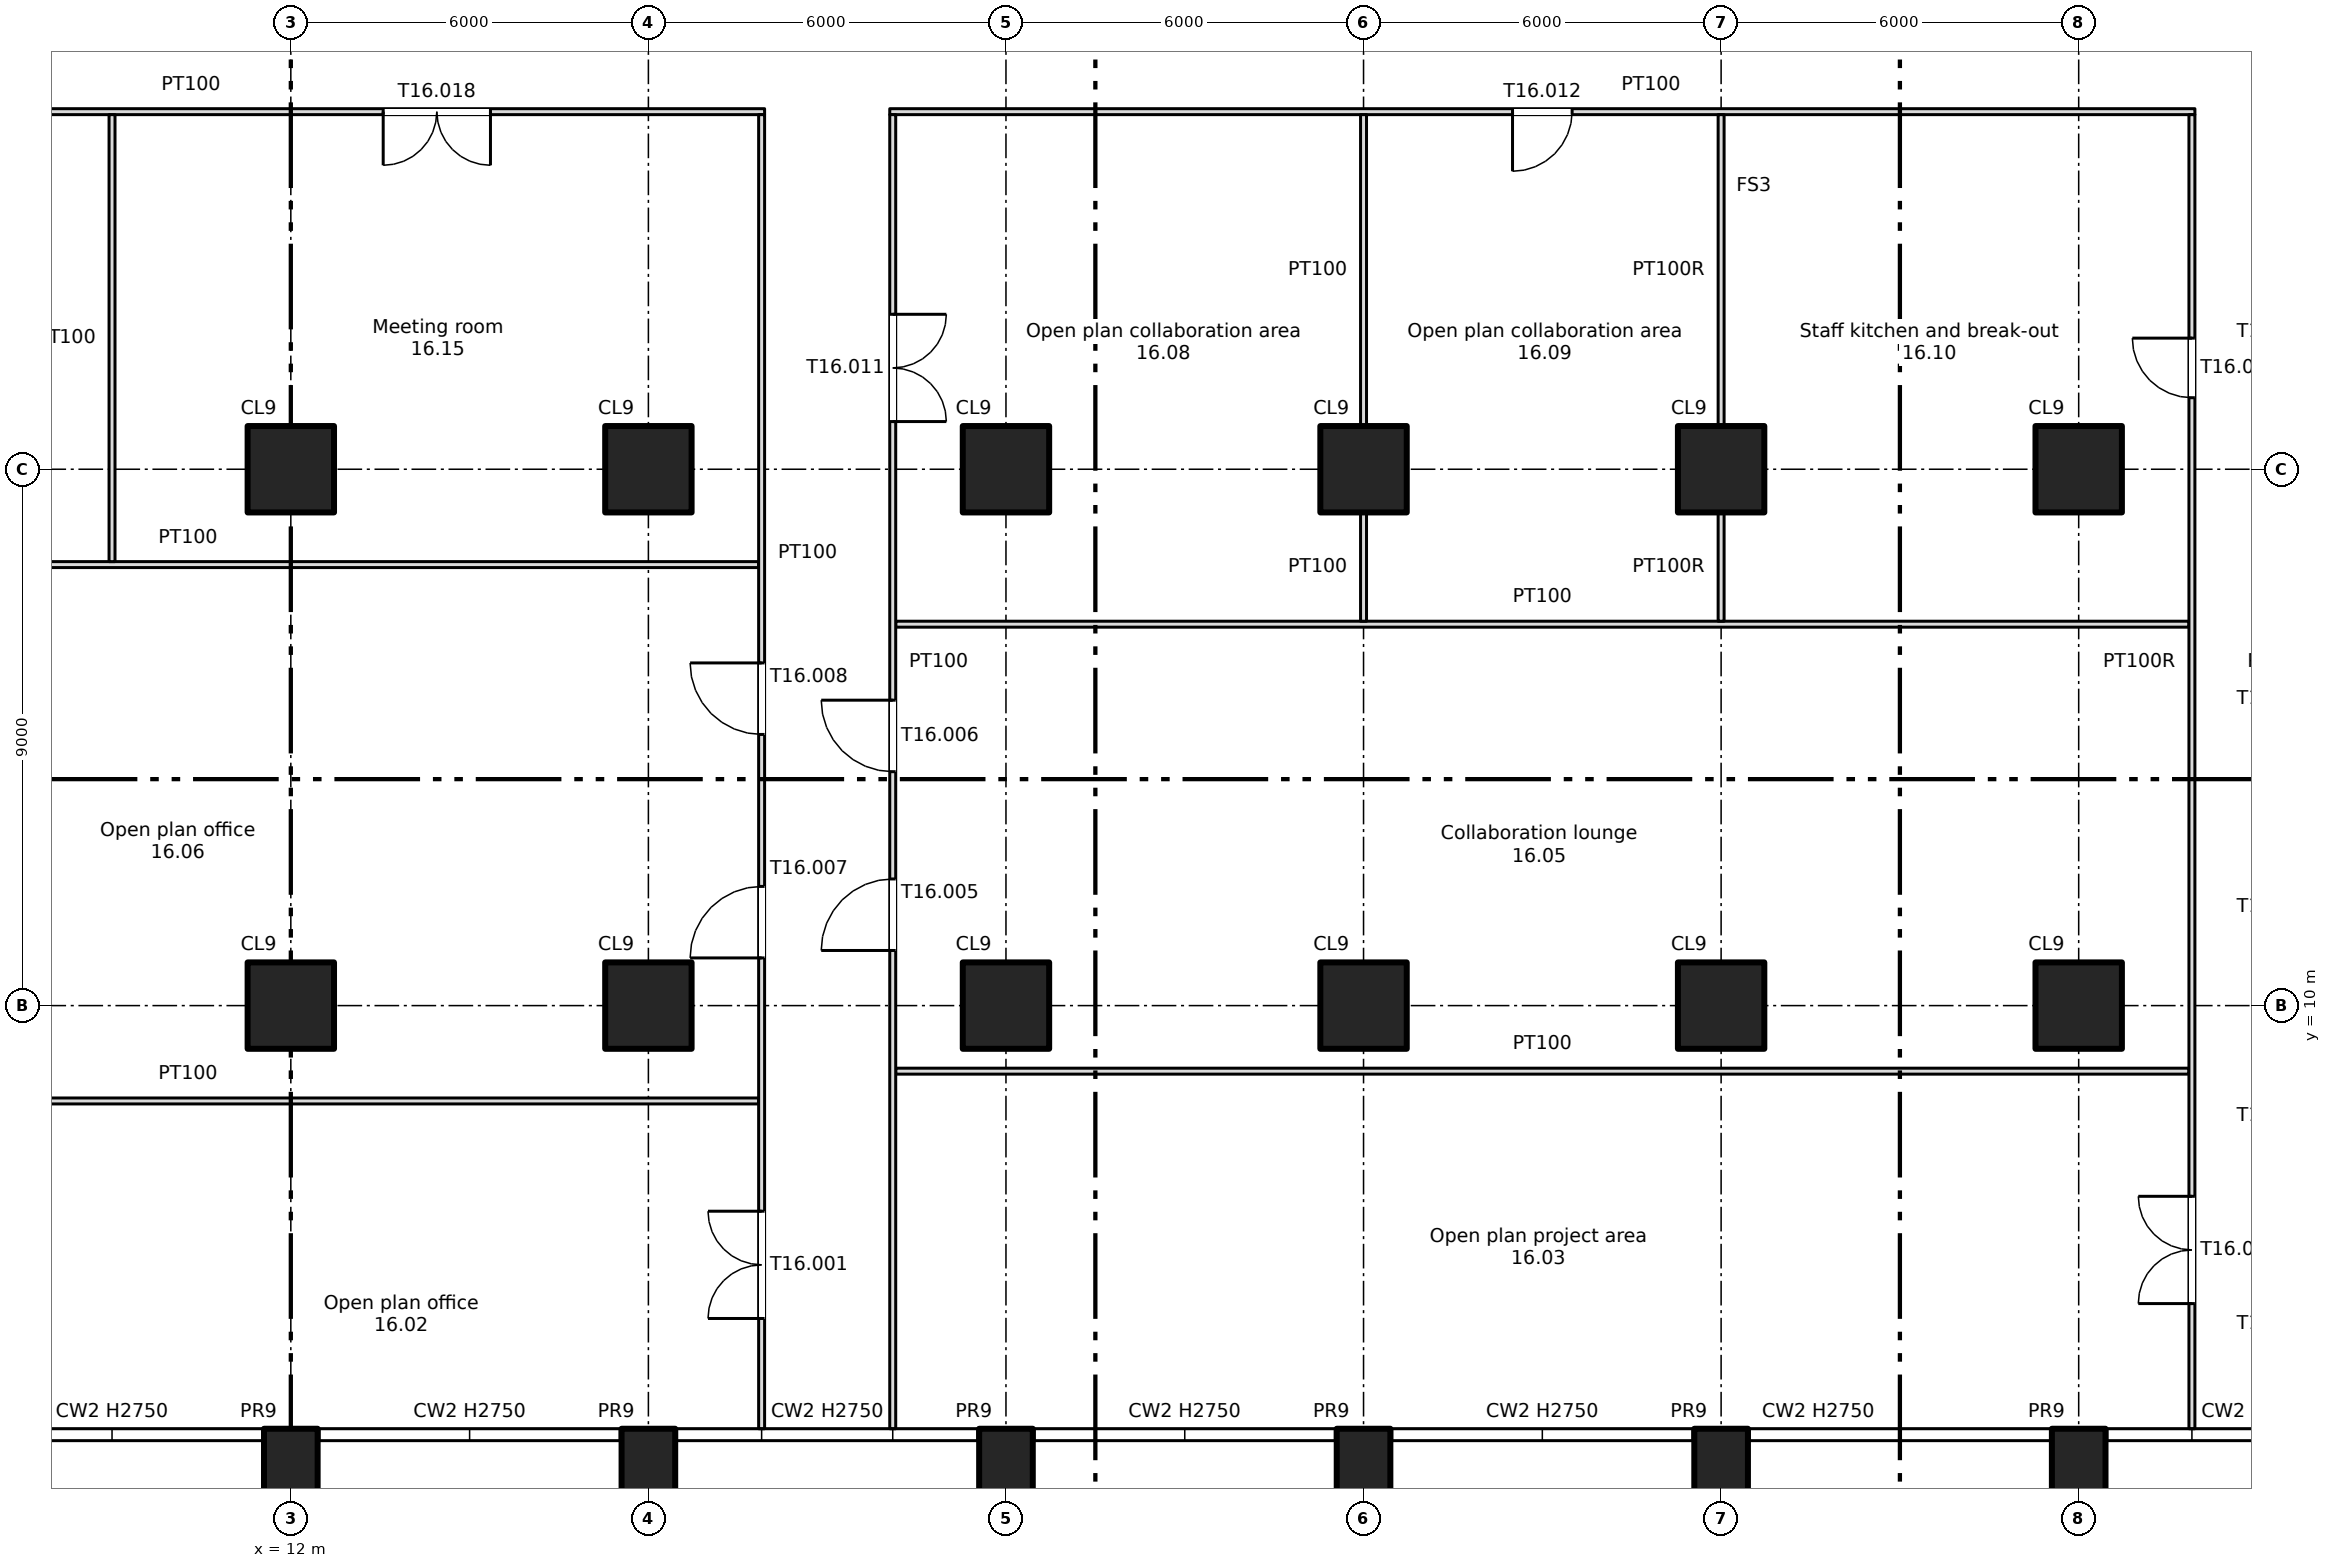
"""IFC4 building model, lengths in metres.
Left out: names, types, materials, properties, quantities, classifications, styles, units other than length and angle.
Written with IfcOpenShell. Run it as: python <this file> out.ifc"""

import sys

from ifc_helpers import new_model, si_unit, direction, frame, frame_2d, origin, origin_2d, place, context, subcontext, project, spatial, rectangle, extrude, element, fill, save


model = new_model("IFC4")
c1 = context("Model", 3, precision=1e-05, world=origin(), true_north=direction((0.0, 1.0)))
c2 = subcontext(c1, "Body", "Model", "MODEL_VIEW")
j1 = project(units=[si_unit("LENGTHUNIT", "METRE"), si_unit("PLANEANGLEUNIT", "RADIAN")], contexts=[c1])
p1 = place(None, origin())
s1 = spatial("IfcSite", under=j1, at=p1, CompositionType="ELEMENT")
p2 = place(p1, origin())
s2 = spatial("IfcBuilding", under=s1, at=p2, CompositionType="ELEMENT")
p3 = place(p2, frame((0.0, 0.0, 98.75)))
s3 = spatial("IfcBuildingStorey", under=s2, at=p3, CompositionType="ELEMENT", Elevation=98.75)
for number, where, z_axis, x_axis in (
    (1, (12.0, 2.2, -0.4), (0.0, 0.0, 1.0), (1.0, 0.0, 0.0)),
    (2, (18.0, 2.2, -0.4), (0.0, 0.0, 1.0), (1.0, 0.0, 0.0)),
    (3, (24.0, 2.2, -0.4), (0.0, 0.0, 1.0), (1.0, 0.0, 0.0)),
    (4, (30.0, 2.2, -0.4), (0.0, 0.0, 1.0), (1.0, 0.0, 0.0)),
    (5, (36.0, 2.2, -0.4), (0.0, 0.0, 1.0), (1.0, 0.0, 0.0)),
    (6, (42.0, 2.2, -0.4), (0.0, 0.0, 1.0), (1.0, 0.0, 0.0)),
):
    element("IfcColumn", number, at=place(p3, frame(where, z_axis=z_axis, x_axis=x_axis)), inside=s3, PredefinedType="COLUMN", context=c2, shape_type="SweptSolid", body=[
        extrude(rectangle(XDim=0.9, YDim=1.4, at=origin_2d()), origin(), (0.0, 0.0, 1.0), 3.75),
    ])
for number, where, z_axis, x_axis in (
    (7, (12.0, 10.0, 0.0), (0.0, 0.0, 1.0), (1.0, 0.0, 0.0)),
    (8, (12.0, 19.0, 0.0), (0.0, 0.0, 1.0), (1.0, 0.0, 0.0)),
    (9, (18.0, 10.0, 0.0), (0.0, 0.0, 1.0), (1.0, 0.0, 0.0)),
    (10, (18.0, 19.0, 0.0), (0.0, 0.0, 1.0), (1.0, 0.0, 0.0)),
    (11, (24.0, 10.0, 0.0), (0.0, 0.0, 1.0), (1.0, 0.0, 0.0)),
    (12, (24.0, 19.0, 0.0), (0.0, 0.0, 1.0), (1.0, 0.0, 0.0)),
    (13, (30.0, 10.0, 0.0), (0.0, 0.0, 1.0), (1.0, 0.0, 0.0)),
    (14, (30.0, 19.0, 0.0), (0.0, 0.0, 1.0), (1.0, 0.0, 0.0)),
    (15, (36.0, 10.0, 0.0), (0.0, 0.0, 1.0), (1.0, 0.0, 0.0)),
    (16, (36.0, 19.0, 0.0), (0.0, 0.0, 1.0), (1.0, 0.0, 0.0)),
    (17, (42.0, 10.0, 0.0), (0.0, 0.0, 1.0), (1.0, 0.0, 0.0)),
    (18, (42.0, 19.0, 0.0), (0.0, 0.0, 1.0), (1.0, 0.0, 0.0)),
):
    element("IfcColumn", number, at=place(p3, frame(where, z_axis=z_axis, x_axis=x_axis)), inside=s3, PredefinedType="COLUMN", context=c2, shape_type="SweptSolid", body=[
        extrude(rectangle(XDim=1.45, YDim=1.45, at=origin_2d()), origin(), (0.0, 0.0, 1.0), 3.35),
    ])
p4 = place(p3, frame((0.7, 8.4, 0.0), z_axis=(0.0, 0.0, 1.0), x_axis=(1.0, 0.0, 0.0)))
e19 = element("IfcWall", 19, at=p4, inside=s3, PredefinedType="PARTITIONING", context=c2, shape_type="SweptSolid", body=[
    extrude(rectangle(XDim=19.15, YDim=0.1, at=frame_2d((9.575, 0.0))), origin(), (0.0, 0.0, 1.0), 3.35),
])
for number, where, z_axis, x_axis in (
    (20, (22.15, 8.9, 0.0), (0.0, 0.0, 1.0), (1.0, 0.0, 0.0)),
    (21, (22.15, 16.4, 0.0), (0.0, 0.0, 1.0), (1.0, 0.0, 0.0)),
):
    element("IfcWall", number, at=place(p3, frame(where, z_axis=z_axis, x_axis=x_axis)), inside=s3, PredefinedType="PARTITIONING", context=c2, shape_type="SweptSolid", body=[
        extrude(rectangle(XDim=21.7, YDim=0.1, at=frame_2d((10.85, 0.0))), origin(), (0.0, 0.0, 1.0), 3.35),
    ])
p5 = place(p3, frame((0.7, 17.4, 0.0), z_axis=(0.0, 0.0, 1.0), x_axis=(1.0, 0.0, 0.0)))
e22 = element("IfcWall", 22, at=p5, inside=s3, PredefinedType="PARTITIONING", context=c2, shape_type="SweptSolid", body=[
    extrude(rectangle(XDim=19.15, YDim=0.1, at=frame_2d((9.575, 0.0))), origin(), (0.0, 0.0, 1.0), 3.35),
])
p6 = place(p3, frame((0.7, 25.0, 0.0), z_axis=(0.0, 0.0, 1.0), x_axis=(1.0, 0.0, 0.0)))
e23 = element("IfcWall", 23, at=p6, inside=s3, PredefinedType="PARTITIONING", context=c2, shape_type="SweptSolid", body=[
    extrude(rectangle(XDim=19.25, YDim=0.1, at=frame_2d((9.625, 0.0))), origin(), (0.0, 0.0, 1.0), 3.35),
])
p7 = place(p6, frame((3.25, 0.0, 0.0)))
e24 = element("IfcOpeningElement", 24, at=p7, cuts=e23, PredefinedType="OPENING", context=c2, shape_type="SweptSolid", body=[
    extrude(rectangle(XDim=1.8, YDim=2.1, at=frame_2d((0.9, 1.05))), frame((0.0, 0.06, 0.0), z_axis=(0.0, -1.0, 0.0), x_axis=(1.0, 0.0, 0.0)), (0.0, 0.0, 1.0), 0.12),
])
p8 = place(p6, frame((12.85, 0.0, 0.0)))
e25 = element("IfcOpeningElement", 25, at=p8, cuts=e23, PredefinedType="OPENING", context=c2, shape_type="SweptSolid", body=[
    extrude(rectangle(XDim=1.8, YDim=2.1, at=frame_2d((0.9, 1.05))), frame((0.0, 0.06, 0.0), z_axis=(0.0, -1.0, 0.0), x_axis=(1.0, 0.0, 0.0)), (0.0, 0.0, 1.0), 0.12),
])
p9 = place(p3, frame((22.05, 25.0, 0.0), z_axis=(0.0, 0.0, 1.0), x_axis=(1.0, 0.0, 0.0)))
e26 = element("IfcWall", 26, at=p9, inside=s3, PredefinedType="PARTITIONING", context=c2, shape_type="SweptSolid", body=[
    extrude(rectangle(XDim=21.9, YDim=0.1, at=frame_2d((10.95, 0.0))), origin(), (0.0, 0.0, 1.0), 3.35),
])
p10 = place(p9, frame((10.45, 0.0, 0.0)))
e27 = element("IfcOpeningElement", 27, at=p10, cuts=e26, PredefinedType="OPENING", context=c2, shape_type="SweptSolid", body=[
    extrude(rectangle(XDim=1.0, YDim=2.1, at=frame_2d((0.5, 1.05))), frame((0.0, 0.06, 0.0), z_axis=(0.0, -1.0, 0.0), x_axis=(1.0, 0.0, 0.0)), (0.0, 0.0, 1.0), 0.12),
])
p11 = place(p3, frame((9.0, 17.45, 0.0), z_axis=(0.0, 0.0, 1.0), x_axis=(0.0, 1.0, 0.0)))
e28 = element("IfcWall", 28, at=p11, inside=s3, PredefinedType="PARTITIONING", context=c2, shape_type="SweptSolid", body=[
    extrude(rectangle(XDim=7.5, YDim=0.1, at=frame_2d((3.75, 0.0))), origin(), (0.0, 0.0, 1.0), 3.35),
])
p12 = place(p3, frame((19.9, 2.9, 0.0), z_axis=(0.0, 0.0, 1.0), x_axis=(0.0, 1.0, 0.0)))
e29 = element("IfcWall", 29, at=p12, inside=s3, PredefinedType="PARTITIONING", context=c2, shape_type="SweptSolid", body=[
    extrude(rectangle(XDim=22.05, YDim=0.1, at=frame_2d((11.025, 0.0))), origin(), (0.0, 0.0, 1.0), 3.35),
])
p13 = place(p12, frame((1.85, 0.0, 0.0)))
e30 = element("IfcOpeningElement", 30, at=p13, cuts=e29, PredefinedType="OPENING", context=c2, shape_type="SweptSolid", body=[
    extrude(rectangle(XDim=1.8, YDim=2.1, at=frame_2d((0.9, 1.05))), frame((0.0, 0.06, 0.0), z_axis=(0.0, -1.0, 0.0), x_axis=(1.0, 0.0, 0.0)), (0.0, 0.0, 1.0), 0.12),
])
p14 = place(p12, frame((7.9, 0.0, 0.0)))
e31 = element("IfcOpeningElement", 31, at=p14, cuts=e29, PredefinedType="OPENING", context=c2, shape_type="SweptSolid", body=[
    extrude(rectangle(XDim=1.2, YDim=2.1, at=frame_2d((0.6, 1.05))), frame((0.0, 0.06, 0.0), z_axis=(0.0, -1.0, 0.0), x_axis=(1.0, 0.0, 0.0)), (0.0, 0.0, 1.0), 0.12),
])
p15 = place(p12, frame((11.65, 0.0, 0.0)))
e32 = element("IfcOpeningElement", 32, at=p15, cuts=e29, PredefinedType="OPENING", context=c2, shape_type="SweptSolid", body=[
    extrude(rectangle(XDim=1.2, YDim=2.1, at=frame_2d((0.6, 1.05))), frame((0.0, 0.06, 0.0), z_axis=(0.0, -1.0, 0.0), x_axis=(1.0, 0.0, 0.0)), (0.0, 0.0, 1.0), 0.12),
])
p16 = place(p3, frame((22.1, 2.9, 0.0), z_axis=(0.0, 0.0, 1.0), x_axis=(0.0, 1.0, 0.0)))
e33 = element("IfcWall", 33, at=p16, inside=s3, PredefinedType="PARTITIONING", context=c2, shape_type="SweptSolid", body=[
    extrude(rectangle(XDim=22.05, YDim=0.1, at=frame_2d((11.025, 0.0))), origin(), (0.0, 0.0, 1.0), 3.35),
])
p17 = place(p16, frame((8.025, 0.0, 0.0)))
e34 = element("IfcOpeningElement", 34, at=p17, cuts=e33, PredefinedType="OPENING", context=c2, shape_type="SweptSolid", body=[
    extrude(rectangle(XDim=1.2, YDim=2.1, at=frame_2d((0.6, 1.05))), frame((0.0, 0.06, 0.0), z_axis=(0.0, -1.0, 0.0), x_axis=(1.0, 0.0, 0.0)), (0.0, 0.0, 1.0), 0.12),
])
p18 = place(p16, frame((11.025, 0.0, 0.0)))
e35 = element("IfcOpeningElement", 35, at=p18, cuts=e33, PredefinedType="OPENING", context=c2, shape_type="SweptSolid", body=[
    extrude(rectangle(XDim=1.2, YDim=2.1, at=frame_2d((0.6, 1.05))), frame((0.0, 0.06, 0.0), z_axis=(0.0, -1.0, 0.0), x_axis=(1.0, 0.0, 0.0)), (0.0, 0.0, 1.0), 0.12),
])
p19 = place(p16, frame((16.9, 0.0, 0.0)))
e36 = element("IfcOpeningElement", 36, at=p19, cuts=e33, PredefinedType="OPENING", context=c2, shape_type="SweptSolid", body=[
    extrude(rectangle(XDim=1.8, YDim=2.1, at=frame_2d((0.9, 1.05))), frame((0.0, 0.06, 0.0), z_axis=(0.0, -1.0, 0.0), x_axis=(1.0, 0.0, 0.0)), (0.0, 0.0, 1.0), 0.12),
])
p20 = place(p3, frame((30.0, 16.45, 0.0), z_axis=(0.0, 0.0, 1.0), x_axis=(0.0, 1.0, 0.0)))
e37 = element("IfcWall", 37, at=p20, inside=s3, PredefinedType="PARTITIONING", context=c2, shape_type="SweptSolid", body=[
    extrude(rectangle(XDim=1.825, YDim=0.1, at=frame_2d((0.913, 0.0))), origin(), (0.0, 0.0, 1.0), 3.35),
])
p21 = place(p3, frame((30.0, 19.725, 0.0), z_axis=(0.0, 0.0, 1.0), x_axis=(0.0, 1.0, 0.0)))
e38 = element("IfcWall", 38, at=p21, inside=s3, PredefinedType="PARTITIONING", context=c2, shape_type="SweptSolid", body=[
    extrude(rectangle(XDim=5.225, YDim=0.1, at=frame_2d((2.612, 0.0))), origin(), (0.0, 0.0, 1.0), 3.35),
])
p22 = place(p3, frame((36.0, 16.45, 0.0), z_axis=(0.0, 0.0, 1.0), x_axis=(0.0, 1.0, 0.0)))
e39 = element("IfcWall", 39, at=p22, inside=s3, PredefinedType="PARTITIONING", context=c2, shape_type="SweptSolid", body=[
    extrude(rectangle(XDim=1.825, YDim=0.1, at=frame_2d((0.913, 0.0))), origin(), (0.0, 0.0, 1.0), 3.35),
])
p23 = place(p3, frame((36.0, 19.725, 0.0), z_axis=(0.0, 0.0, 1.0), x_axis=(0.0, 1.0, 0.0)))
e40 = element("IfcWall", 40, at=p23, inside=s3, PredefinedType="PARTITIONING", context=c2, shape_type="SweptSolid", body=[
    extrude(rectangle(XDim=5.225, YDim=0.1, at=frame_2d((2.612, 0.0))), origin(), (0.0, 0.0, 1.0), 3.35),
])
p24 = place(p3, frame((43.9, 2.9, 0.0), z_axis=(0.0, 0.0, 1.0), x_axis=(0.0, 1.0, 0.0)))
e41 = element("IfcWall", 41, at=p24, inside=s3, PredefinedType="PARTITIONING", context=c2, shape_type="SweptSolid", body=[
    extrude(rectangle(XDim=22.05, YDim=0.1, at=frame_2d((11.025, 0.0))), origin(), (0.0, 0.0, 1.0), 3.35),
])
p25 = place(p24, frame((2.1, 0.0, 0.0)))
e42 = element("IfcOpeningElement", 42, at=p25, cuts=e41, PredefinedType="OPENING", context=c2, shape_type="SweptSolid", body=[
    extrude(rectangle(XDim=1.8, YDim=2.1, at=frame_2d((0.9, 1.05))), frame((0.0, 0.06, 0.0), z_axis=(0.0, -1.0, 0.0), x_axis=(1.0, 0.0, 0.0)), (0.0, 0.0, 1.0), 0.12),
])
p26 = place(p24, frame((17.3, 0.0, 0.0)))
e43 = element("IfcOpeningElement", 43, at=p26, cuts=e41, PredefinedType="OPENING", context=c2, shape_type="SweptSolid", body=[
    extrude(rectangle(XDim=1.0, YDim=2.1, at=frame_2d((0.5, 1.05))), frame((0.0, 0.06, 0.0), z_axis=(0.0, -1.0, 0.0), x_axis=(1.0, 0.0, 0.0)), (0.0, 0.0, 1.0), 0.12),
])
p27 = place(p13, origin())
e44 = element("IfcDoor", 44, at=p27, inside=s3, OperationType="DOUBLE_DOOR_SINGLE_SWING", PredefinedType="DOOR", context=c2, shape_type="SweptSolid", body=[
    extrude(rectangle(XDim=1.8, YDim=2.1, at=frame_2d((0.9, 1.05))), frame((0.0, 0.025, 0.0), z_axis=(0.0, -1.0, 0.0), x_axis=(1.0, 0.0, 0.0)), (0.0, 0.0, 1.0), 0.05),
])
fill(e30, e44)
p28 = place(p25, origin())
e45 = element("IfcDoor", 45, at=p28, inside=s3, OperationType="DOUBLE_DOOR_SINGLE_SWING", PredefinedType="DOOR", context=c2, shape_type="SweptSolid", body=[
    extrude(rectangle(XDim=1.8, YDim=2.1, at=frame_2d((0.9, 1.05))), frame((0.0, 0.025, 0.0), z_axis=(0.0, -1.0, 0.0), x_axis=(1.0, 0.0, 0.0)), (0.0, 0.0, 1.0), 0.05),
])
fill(e42, e45)
p29 = place(p17, origin())
e46 = element("IfcDoor", 46, at=p29, inside=s3, OperationType="SINGLE_SWING_LEFT", PredefinedType="DOOR", context=c2, shape_type="SweptSolid", body=[
    extrude(rectangle(XDim=1.2, YDim=2.1, at=frame_2d((0.6, 1.05))), frame((0.0, 0.025, 0.0), z_axis=(0.0, -1.0, 0.0), x_axis=(1.0, 0.0, 0.0)), (0.0, 0.0, 1.0), 0.05),
])
fill(e34, e46)
p30 = place(p18, origin())
e47 = element("IfcDoor", 47, at=p30, inside=s3, OperationType="SINGLE_SWING_RIGHT", PredefinedType="DOOR", context=c2, shape_type="SweptSolid", body=[
    extrude(rectangle(XDim=1.2, YDim=2.1, at=frame_2d((0.6, 1.05))), frame((0.0, 0.025, 0.0), z_axis=(0.0, -1.0, 0.0), x_axis=(1.0, 0.0, 0.0)), (0.0, 0.0, 1.0), 0.05),
])
fill(e35, e47)
p31 = place(p14, origin())
e48 = element("IfcDoor", 48, at=p31, inside=s3, OperationType="SINGLE_SWING_LEFT", PredefinedType="DOOR", context=c2, shape_type="SweptSolid", body=[
    extrude(rectangle(XDim=1.2, YDim=2.1, at=frame_2d((0.6, 1.05))), frame((0.0, 0.025, 0.0), z_axis=(0.0, -1.0, 0.0), x_axis=(1.0, 0.0, 0.0)), (0.0, 0.0, 1.0), 0.05),
])
fill(e31, e48)
p32 = place(p15, origin())
e49 = element("IfcDoor", 49, at=p32, inside=s3, OperationType="SINGLE_SWING_RIGHT", PredefinedType="DOOR", context=c2, shape_type="SweptSolid", body=[
    extrude(rectangle(XDim=1.2, YDim=2.1, at=frame_2d((0.6, 1.05))), frame((0.0, 0.025, 0.0), z_axis=(0.0, -1.0, 0.0), x_axis=(1.0, 0.0, 0.0)), (0.0, 0.0, 1.0), 0.05),
])
fill(e32, e49)
p33 = place(p19, origin())
e50 = element("IfcDoor", 50, at=p33, inside=s3, OperationType="DOUBLE_DOOR_SINGLE_SWING", PredefinedType="DOOR", context=c2, shape_type="SweptSolid", body=[
    extrude(rectangle(XDim=1.8, YDim=2.1, at=frame_2d((0.9, 1.05))), frame((0.0, 0.025, 0.0), z_axis=(0.0, -1.0, 0.0), x_axis=(1.0, 0.0, 0.0)), (0.0, 0.0, 1.0), 0.05),
])
fill(e36, e50)
p34 = place(p10, origin())
e51 = element("IfcDoor", 51, at=p34, inside=s3, OperationType="SINGLE_SWING_LEFT", PredefinedType="DOOR", context=c2, shape_type="SweptSolid", body=[
    extrude(rectangle(XDim=1.0, YDim=2.1, at=frame_2d((0.5, 1.05))), frame((0.0, 0.025, 0.0), z_axis=(0.0, -1.0, 0.0), x_axis=(1.0, 0.0, 0.0)), (0.0, 0.0, 1.0), 0.05),
])
fill(e27, e51)
p35 = place(p26, origin())
e52 = element("IfcDoor", 52, at=p35, inside=s3, OperationType="SINGLE_SWING_RIGHT", PredefinedType="DOOR", context=c2, shape_type="SweptSolid", body=[
    extrude(rectangle(XDim=1.0, YDim=2.1, at=frame_2d((0.5, 1.05))), frame((0.0, 0.025, 0.0), z_axis=(0.0, -1.0, 0.0), x_axis=(1.0, 0.0, 0.0)), (0.0, 0.0, 1.0), 0.05),
])
fill(e43, e52)
p36 = place(p8, origin())
e53 = element("IfcDoor", 53, at=p36, inside=s3, OperationType="DOUBLE_DOOR_SINGLE_SWING", PredefinedType="DOOR", context=c2, shape_type="SweptSolid", body=[
    extrude(rectangle(XDim=1.8, YDim=2.1, at=frame_2d((0.9, 1.05))), frame((0.0, 0.025, 0.0), z_axis=(0.0, -1.0, 0.0), x_axis=(1.0, 0.0, 0.0)), (0.0, 0.0, 1.0), 0.05),
])
fill(e25, e53)
save(model, sys.argv[1])
